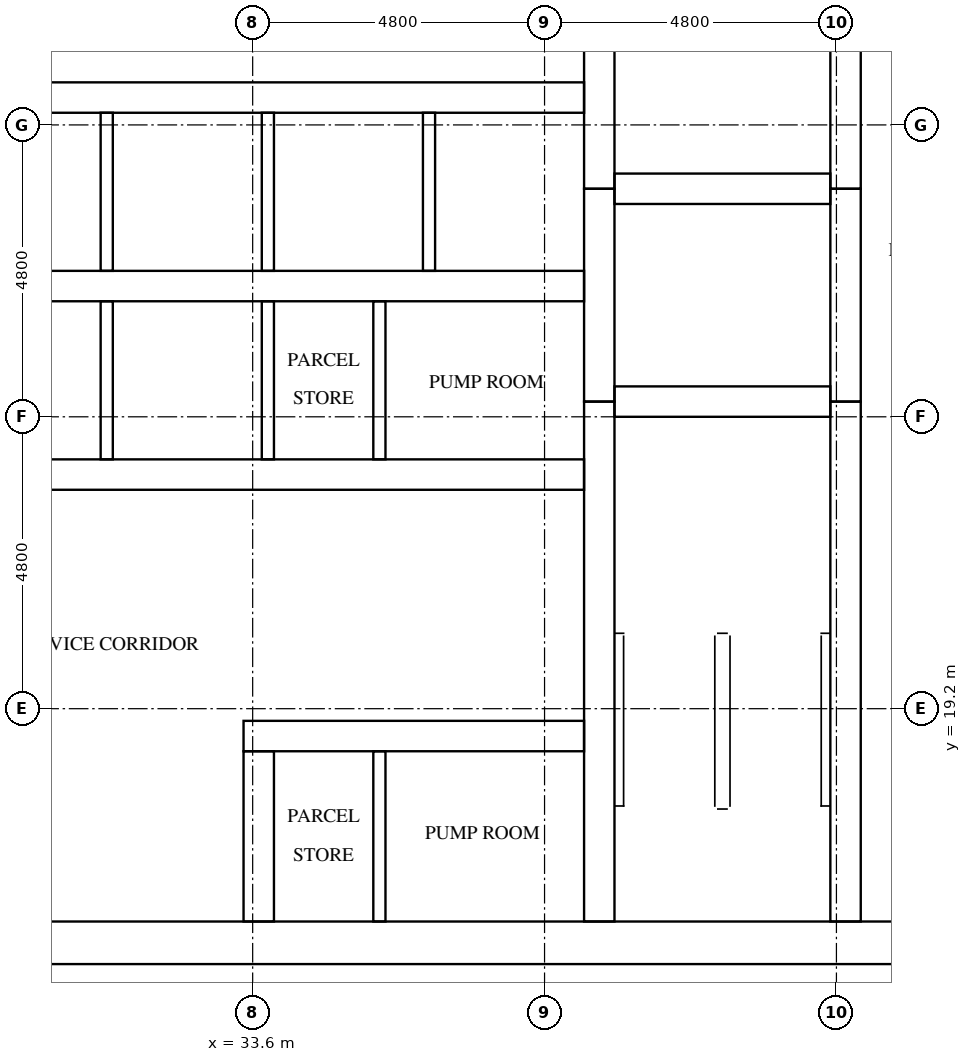
"""IFC4 building model, lengths in metres.
Left out: names, types, materials, properties, quantities, classifications, styles, units other than length and angle.
Written with IfcOpenShell. Run it as: python <this file> out.ifc"""

import sys

from ifc_helpers import new_model, si_unit, direction, frame, frame_2d, origin, place, context, subcontext, project, spatial, rectangle, extrude, element, fill, save


model = new_model("IFC4")
c1 = context("Model", 3, precision=1e-05, world=origin(), true_north=direction((0.0, 1.0)))
c2 = subcontext(c1, "Body", "Model", "MODEL_VIEW")
j1 = project(units=[si_unit("LENGTHUNIT", "METRE"), si_unit("PLANEANGLEUNIT", "RADIAN")], contexts=[c1])
p1 = place(None, origin())
s1 = spatial("IfcSite", under=j1, at=p1, CompositionType="ELEMENT")
p2 = place(p1, origin())
s2 = spatial("IfcBuilding", under=s1, at=p2, CompositionType="ELEMENT")
p3 = place(p2, frame((0.0, 0.0, 222.8)))
s3 = spatial("IfcBuildingStorey", under=s2, at=p3, CompositionType="ELEMENT", Elevation=222.8)
p4 = place(p3, frame((15.0, 15.35, 0.0), z_axis=(0.0, 0.0, 1.0), x_axis=(1.0, 0.0, 0.0)))
e1 = element("IfcWall", 1, at=p4, inside=s3, PredefinedType="SHEAR", context=c2, shape_type="SweptSolid", body=[
    extrude(rectangle(XDim=32.4, YDim=0.7, at=frame_2d((16.2, 0.0))), origin(), (0.0, 0.0, 1.0), 3.2),
])
p5 = place(p4, frame((15.3, 0.0, 0.0)))
e2 = element("IfcOpeningElement", 2, at=p5, cuts=e1, PredefinedType="OPENING", context=c2, shape_type="SweptSolid", body=[
    extrude(rectangle(XDim=1.8, YDim=2.1, at=frame_2d((0.9, 1.05))), frame((0.0, 0.36, 0.0), z_axis=(0.0, -1.0, 0.0), x_axis=(1.0, 0.0, 0.0)), (0.0, 0.0, 1.0), 0.72),
])
p6 = place(p3, frame((39.3, 15.7, 0.0), z_axis=(0.0, 0.0, 1.0), x_axis=(0.0, 1.0, 0.0)))
e3 = element("IfcWall", 3, at=p6, inside=s3, PredefinedType="SHEAR", context=c2, shape_type="SweptSolid", body=[
    extrude(rectangle(XDim=8.55, YDim=0.5, at=frame_2d((4.275, 0.0))), origin(), (0.0, 0.0, 1.0), 3.2),
])
p7 = place(p3, frame((39.3, 24.25, 0.0), z_axis=(0.0, 0.0, 1.0), x_axis=(0.0, 1.0, 0.0)))
e4 = element("IfcWall", 4, at=p7, inside=s3, PredefinedType="SHEAR", context=c2, shape_type="SweptSolid", body=[
    extrude(rectangle(XDim=3.5, YDim=0.5, at=frame_2d((1.75, 0.0))), origin(), (0.0, 0.0, 1.0), 3.2),
])
p8 = place(p3, frame((39.3, 27.75, 0.0), z_axis=(0.0, 0.0, 1.0), x_axis=(0.0, 1.0, 0.0)))
e5 = element("IfcWall", 5, at=p8, inside=s3, PredefinedType="SHEAR", context=c2, shape_type="SweptSolid", body=[
    extrude(rectangle(XDim=9.35, YDim=0.5, at=frame_2d((4.675, 0.0))), origin(), (0.0, 0.0, 1.0), 3.2),
])
p9 = place(p3, frame((43.35, 15.7, 0.0), z_axis=(0.0, 0.0, 1.0), x_axis=(0.0, 1.0, 0.0)))
e6 = element("IfcWall", 6, at=p9, inside=s3, PredefinedType="SHEAR", context=c2, shape_type="SweptSolid", body=[
    extrude(rectangle(XDim=8.55, YDim=0.5, at=frame_2d((4.275, 0.0))), origin(), (0.0, 0.0, 1.0), 3.2),
])
p10 = place(p9, frame((0.5, 0.0, 0.0)))
e7 = element("IfcOpeningElement", 7, at=p10, cuts=e6, PredefinedType="OPENING", context=c2, shape_type="SweptSolid", body=[
    extrude(rectangle(XDim=1.2, YDim=2.1, at=frame_2d((0.6, 1.05))), frame((0.0, 0.26, 0.0), z_axis=(0.0, -1.0, 0.0), x_axis=(1.0, 0.0, 0.0)), (0.0, 0.0, 1.0), 0.52),
])
p11 = place(p3, frame((43.35, 24.25, 0.0), z_axis=(0.0, 0.0, 1.0), x_axis=(0.0, 1.0, 0.0)))
e8 = element("IfcWall", 8, at=p11, inside=s3, PredefinedType="SHEAR", context=c2, shape_type="SweptSolid", body=[
    extrude(rectangle(XDim=3.5, YDim=0.5, at=frame_2d((1.75, 0.0))), origin(), (0.0, 0.0, 1.0), 3.2),
])
p12 = place(p11, frame((1.2, 0.0, 0.0)))
e9 = element("IfcOpeningElement", 9, at=p12, cuts=e8, PredefinedType="OPENING", context=c2, shape_type="SweptSolid", body=[
    extrude(rectangle(XDim=1.1, YDim=2.1, at=frame_2d((0.55, 1.05))), frame((0.0, 0.26, 0.0), z_axis=(0.0, -1.0, 0.0), x_axis=(1.0, 0.0, 0.0)), (0.0, 0.0, 1.0), 0.52),
])
p13 = place(p3, frame((43.35, 27.75, 0.0), z_axis=(0.0, 0.0, 1.0), x_axis=(0.0, 1.0, 0.0)))
e10 = element("IfcWall", 10, at=p13, inside=s3, PredefinedType="SHEAR", context=c2, shape_type="SweptSolid", body=[
    extrude(rectangle(XDim=9.35, YDim=0.5, at=frame_2d((4.675, 0.0))), origin(), (0.0, 0.0, 1.0), 3.2),
])
p14 = place(p13, frame((7.65, 0.0, 0.0)))
e11 = element("IfcOpeningElement", 11, at=p14, cuts=e10, PredefinedType="OPENING", context=c2, shape_type="SweptSolid", body=[
    extrude(rectangle(XDim=1.2, YDim=2.1, at=frame_2d((0.6, 1.05))), frame((0.0, 0.26, 0.0), z_axis=(0.0, -1.0, 0.0), x_axis=(1.0, 0.0, 0.0)), (0.0, 0.0, 1.0), 0.52),
])
for number, where, z_axis, x_axis in (
    (12, (39.55, 24.25, 0.0), (0.0, 0.0, 1.0), (1.0, 0.0, 0.0)),
    (13, (39.55, 27.75, 0.0), (0.0, 0.0, 1.0), (1.0, 0.0, 0.0)),
):
    element("IfcWall", number, at=place(p3, frame(where, z_axis=z_axis, x_axis=x_axis)), inside=s3, PredefinedType="SHEAR", context=c2, shape_type="SweptSolid", body=[
        extrude(rectangle(XDim=3.55, YDim=0.5, at=frame_2d((1.775, 0.0))), origin(), (0.0, 0.0, 1.0), 3.2),
    ])
p15 = place(p3, frame((33.45, 18.75, 0.0), z_axis=(0.0, 0.0, 1.0), x_axis=(1.0, 0.0, 0.0)))
e14 = element("IfcWall", 14, at=p15, inside=s3, PredefinedType="SHEAR", context=c2, shape_type="SweptSolid", body=[
    extrude(rectangle(XDim=5.6, YDim=0.5, at=frame_2d((2.8, 0.0))), origin(), (0.0, 0.0, 1.0), 3.2),
])
p16 = place(p15, frame((0.817, 0.0, 0.0)))
e15 = element("IfcOpeningElement", 15, at=p16, cuts=e14, PredefinedType="OPENING", context=c2, shape_type="SweptSolid", body=[
    extrude(rectangle(XDim=1.0, YDim=2.1, at=frame_2d((0.5, 1.05))), frame((0.0, 0.26, 0.0), z_axis=(0.0, -1.0, 0.0), x_axis=(1.0, 0.0, 0.0)), (0.0, 0.0, 1.0), 0.52),
])
p17 = place(p15, frame((3.467, 0.0, 0.0)))
e16 = element("IfcOpeningElement", 16, at=p17, cuts=e14, PredefinedType="OPENING", context=c2, shape_type="SweptSolid", body=[
    extrude(rectangle(XDim=1.0, YDim=2.1, at=frame_2d((0.5, 1.05))), frame((0.0, 0.26, 0.0), z_axis=(0.0, -1.0, 0.0), x_axis=(1.0, 0.0, 0.0)), (0.0, 0.0, 1.0), 0.52),
])
p18 = place(p3, frame((23.35, 23.05, 0.0), z_axis=(0.0, 0.0, 1.0), x_axis=(1.0, 0.0, 0.0)))
e17 = element("IfcWall", 17, at=p18, inside=s3, PredefinedType="SHEAR", context=c2, shape_type="SweptSolid", body=[
    extrude(rectangle(XDim=15.7, YDim=0.5, at=frame_2d((7.85, 0.0))), origin(), (0.0, 0.0, 1.0), 3.2),
])
p19 = place(p18, frame((0.317, 0.0, 0.0)))
e18 = element("IfcOpeningElement", 18, at=p19, cuts=e17, PredefinedType="OPENING", context=c2, shape_type="SweptSolid", body=[
    extrude(rectangle(XDim=1.0, YDim=2.1, at=frame_2d((0.5, 1.05))), frame((0.0, 0.26, 0.0), z_axis=(0.0, -1.0, 0.0), x_axis=(1.0, 0.0, 0.0)), (0.0, 0.0, 1.0), 0.52),
])
p20 = place(p18, frame((2.967, 0.0, 0.0)))
e19 = element("IfcOpeningElement", 19, at=p20, cuts=e17, PredefinedType="OPENING", context=c2, shape_type="SweptSolid", body=[
    extrude(rectangle(XDim=1.0, YDim=2.1, at=frame_2d((0.5, 1.05))), frame((0.0, 0.26, 0.0), z_axis=(0.0, -1.0, 0.0), x_axis=(1.0, 0.0, 0.0)), (0.0, 0.0, 1.0), 0.52),
])
p21 = place(p18, frame((10.917, 0.0, 0.0)))
e20 = element("IfcOpeningElement", 20, at=p21, cuts=e17, PredefinedType="OPENING", context=c2, shape_type="SweptSolid", body=[
    extrude(rectangle(XDim=1.0, YDim=2.1, at=frame_2d((0.5, 1.05))), frame((0.0, 0.26, 0.0), z_axis=(0.0, -1.0, 0.0), x_axis=(1.0, 0.0, 0.0)), (0.0, 0.0, 1.0), 0.52),
])
p22 = place(p18, frame((13.567, 0.0, 0.0)))
e21 = element("IfcOpeningElement", 21, at=p22, cuts=e17, PredefinedType="OPENING", context=c2, shape_type="SweptSolid", body=[
    extrude(rectangle(XDim=1.0, YDim=2.1, at=frame_2d((0.5, 1.05))), frame((0.0, 0.26, 0.0), z_axis=(0.0, -1.0, 0.0), x_axis=(1.0, 0.0, 0.0)), (0.0, 0.0, 1.0), 0.52),
])
p23 = place(p3, frame((23.35, 26.15, 0.0), z_axis=(0.0, 0.0, 1.0), x_axis=(1.0, 0.0, 0.0)))
e22 = element("IfcWall", 22, at=p23, inside=s3, PredefinedType="SHEAR", context=c2, shape_type="SweptSolid", body=[
    extrude(rectangle(XDim=15.7, YDim=0.5, at=frame_2d((7.85, 0.0))), origin(), (0.0, 0.0, 1.0), 3.2),
])
p24 = place(p3, frame((23.35, 29.25, 0.0), z_axis=(0.0, 0.0, 1.0), x_axis=(1.0, 0.0, 0.0)))
e23 = element("IfcWall", 23, at=p24, inside=s3, PredefinedType="SHEAR", context=c2, shape_type="SweptSolid", body=[
    extrude(rectangle(XDim=15.7, YDim=0.5, at=frame_2d((7.85, 0.0))), origin(), (0.0, 0.0, 1.0), 3.2),
])
p25 = place(p24, frame((0.675, 0.0, 0.0)))
e24 = element("IfcOpeningElement", 24, at=p25, cuts=e23, PredefinedType="OPENING", context=c2, shape_type="SweptSolid", body=[
    extrude(rectangle(XDim=1.1, YDim=2.1, at=frame_2d((0.55, 1.05))), frame((0.0, 0.26, 0.0), z_axis=(0.0, -1.0, 0.0), x_axis=(1.0, 0.0, 0.0)), (0.0, 0.0, 1.0), 0.52),
])
p26 = place(p24, frame((3.325, 0.0, 0.0)))
e25 = element("IfcOpeningElement", 25, at=p26, cuts=e23, PredefinedType="OPENING", context=c2, shape_type="SweptSolid", body=[
    extrude(rectangle(XDim=1.1, YDim=2.1, at=frame_2d((0.55, 1.05))), frame((0.0, 0.26, 0.0), z_axis=(0.0, -1.0, 0.0), x_axis=(1.0, 0.0, 0.0)), (0.0, 0.0, 1.0), 0.52),
])
p27 = place(p24, frame((5.975, 0.0, 0.0)))
e26 = element("IfcOpeningElement", 26, at=p27, cuts=e23, PredefinedType="OPENING", context=c2, shape_type="SweptSolid", body=[
    extrude(rectangle(XDim=1.1, YDim=2.1, at=frame_2d((0.55, 1.05))), frame((0.0, 0.26, 0.0), z_axis=(0.0, -1.0, 0.0), x_axis=(1.0, 0.0, 0.0)), (0.0, 0.0, 1.0), 0.52),
])
p28 = place(p24, frame((8.625, 0.0, 0.0)))
e27 = element("IfcOpeningElement", 27, at=p28, cuts=e23, PredefinedType="OPENING", context=c2, shape_type="SweptSolid", body=[
    extrude(rectangle(XDim=1.1, YDim=2.1, at=frame_2d((0.55, 1.05))), frame((0.0, 0.26, 0.0), z_axis=(0.0, -1.0, 0.0), x_axis=(1.0, 0.0, 0.0)), (0.0, 0.0, 1.0), 0.52),
])
p29 = place(p24, frame((11.275, 0.0, 0.0)))
e28 = element("IfcOpeningElement", 28, at=p29, cuts=e23, PredefinedType="OPENING", context=c2, shape_type="SweptSolid", body=[
    extrude(rectangle(XDim=1.1, YDim=2.1, at=frame_2d((0.55, 1.05))), frame((0.0, 0.26, 0.0), z_axis=(0.0, -1.0, 0.0), x_axis=(1.0, 0.0, 0.0)), (0.0, 0.0, 1.0), 0.52),
])
p30 = place(p24, frame((13.925, 0.0, 0.0)))
e29 = element("IfcOpeningElement", 29, at=p30, cuts=e23, PredefinedType="OPENING", context=c2, shape_type="SweptSolid", body=[
    extrude(rectangle(XDim=1.1, YDim=2.1, at=frame_2d((0.55, 1.05))), frame((0.0, 0.26, 0.0), z_axis=(0.0, -1.0, 0.0), x_axis=(1.0, 0.0, 0.0)), (0.0, 0.0, 1.0), 0.52),
])
p31 = place(p3, frame((33.7, 15.7, 0.0), z_axis=(0.0, 0.0, 1.0), x_axis=(0.0, 1.0, 0.0)))
e30 = element("IfcWall", 30, at=p31, inside=s3, PredefinedType="SHEAR", context=c2, shape_type="SweptSolid", body=[
    extrude(rectangle(XDim=2.8, YDim=0.5, at=frame_2d((1.4, 0.0))), origin(), (0.0, 0.0, 1.0), 3.2),
])
p32 = place(p3, frame((31.2, 23.3, 0.0), z_axis=(0.0, 0.0, 1.0), x_axis=(0.0, 1.0, 0.0)))
e31 = element("IfcWall", 31, at=p32, inside=s3, PredefinedType="SOLIDWALL", context=c2, shape_type="SweptSolid", body=[
    extrude(rectangle(XDim=2.6, YDim=0.2, at=frame_2d((1.3, 0.0))), origin(), (0.0, 0.0, 1.0), 3.2),
])
p33 = place(p3, frame((31.2, 26.4, 0.0), z_axis=(0.0, 0.0, 1.0), x_axis=(0.0, 1.0, 0.0)))
e32 = element("IfcWall", 32, at=p33, inside=s3, PredefinedType="SOLIDWALL", context=c2, shape_type="SweptSolid", body=[
    extrude(rectangle(XDim=2.6, YDim=0.2, at=frame_2d((1.3, 0.0))), origin(), (0.0, 0.0, 1.0), 3.2),
])
p34 = place(p3, frame((33.85, 23.3, 0.0), z_axis=(0.0, 0.0, 1.0), x_axis=(0.0, 1.0, 0.0)))
e33 = element("IfcWall", 33, at=p34, inside=s3, PredefinedType="SOLIDWALL", context=c2, shape_type="SweptSolid", body=[
    extrude(rectangle(XDim=2.6, YDim=0.2, at=frame_2d((1.3, 0.0))), origin(), (0.0, 0.0, 1.0), 3.2),
])
for number, where, z_axis, x_axis in (
    (34, (33.85, 26.4, 0.0), (0.0, 0.0, 1.0), (0.0, 1.0, 0.0)),
    (35, (36.5, 26.4, 0.0), (0.0, 0.0, 1.0), (0.0, 1.0, 0.0)),
):
    element("IfcWall", number, at=place(p3, frame(where, z_axis=z_axis, x_axis=x_axis)), inside=s3, PredefinedType="SOLIDWALL", context=c2, shape_type="SweptSolid", body=[
        extrude(rectangle(XDim=2.6, YDim=0.2, at=frame_2d((1.3, 0.0))), origin(), (0.0, 0.0, 1.0), 3.2),
    ])
p35 = place(p3, frame((35.684, 23.3, 0.0), z_axis=(0.0, 0.0, 1.0), x_axis=(0.0, 1.0, 0.0)))
e36 = element("IfcWall", 36, at=p35, inside=s3, PredefinedType="PARTITIONING", context=c2, shape_type="SweptSolid", body=[
    extrude(rectangle(XDim=2.6, YDim=0.2, at=frame_2d((1.3, 0.0))), origin(), (0.0, 0.0, 1.0), 3.2),
])
p36 = place(p3, frame((35.684, 15.7, 0.0), z_axis=(0.0, 0.0, 1.0), x_axis=(0.0, 1.0, 0.0)))
e37 = element("IfcWall", 37, at=p36, inside=s3, PredefinedType="PARTITIONING", context=c2, shape_type="SweptSolid", body=[
    extrude(rectangle(XDim=2.8, YDim=0.2, at=frame_2d((1.4, 0.0))), origin(), (0.0, 0.0, 1.0), 3.2),
])
p37 = place(p27, origin())
e38 = element("IfcDoor", 38, at=p37, inside=s3, OperationType="DOUBLE_DOOR_SLIDING", PredefinedType="DOOR", context=c2, shape_type="SweptSolid", body=[
    extrude(rectangle(XDim=1.1, YDim=2.1, at=frame_2d((0.55, 1.05))), frame((0.0, 0.025, 0.0), z_axis=(0.0, -1.0, 0.0), x_axis=(1.0, 0.0, 0.0)), (0.0, 0.0, 1.0), 0.05),
])
fill(e26, e38)
p38 = place(p28, origin())
e39 = element("IfcDoor", 39, at=p38, inside=s3, OperationType="DOUBLE_DOOR_SLIDING", PredefinedType="DOOR", context=c2, shape_type="SweptSolid", body=[
    extrude(rectangle(XDim=1.1, YDim=2.1, at=frame_2d((0.55, 1.05))), frame((0.0, 0.025, 0.0), z_axis=(0.0, -1.0, 0.0), x_axis=(1.0, 0.0, 0.0)), (0.0, 0.0, 1.0), 0.05),
])
fill(e27, e39)
p39 = place(p29, origin())
e40 = element("IfcDoor", 40, at=p39, inside=s3, OperationType="DOUBLE_DOOR_SLIDING", PredefinedType="DOOR", context=c2, shape_type="SweptSolid", body=[
    extrude(rectangle(XDim=1.1, YDim=2.1, at=frame_2d((0.55, 1.05))), frame((0.0, 0.025, 0.0), z_axis=(0.0, -1.0, 0.0), x_axis=(1.0, 0.0, 0.0)), (0.0, 0.0, 1.0), 0.05),
])
fill(e28, e40)
p40 = place(p30, origin())
e41 = element("IfcDoor", 41, at=p40, inside=s3, OperationType="DOUBLE_DOOR_SLIDING", PredefinedType="DOOR", context=c2, shape_type="SweptSolid", body=[
    extrude(rectangle(XDim=1.1, YDim=2.1, at=frame_2d((0.55, 1.05))), frame((0.0, 0.025, 0.0), z_axis=(0.0, -1.0, 0.0), x_axis=(1.0, 0.0, 0.0)), (0.0, 0.0, 1.0), 0.05),
])
fill(e29, e41)
p41 = place(p12, origin())
e42 = element("IfcDoor", 42, at=p41, inside=s3, OperationType="DOUBLE_DOOR_SLIDING", PredefinedType="DOOR", context=c2, shape_type="SweptSolid", body=[
    extrude(rectangle(XDim=1.1, YDim=2.1, at=frame_2d((0.55, 1.05))), frame((0.0, 0.025, 0.0), z_axis=(0.0, -1.0, 0.0), x_axis=(1.0, 0.0, 0.0)), (0.0, 0.0, 1.0), 0.05),
])
fill(e9, e42)
p42 = place(p10, origin())
e43 = element("IfcDoor", 43, at=p42, inside=s3, OperationType="SINGLE_SWING_LEFT", PredefinedType="DOOR", context=c2, shape_type="SweptSolid", body=[
    extrude(rectangle(XDim=1.2, YDim=2.1, at=frame_2d((0.6, 1.05))), frame((0.0, 0.025, 0.0), z_axis=(0.0, -1.0, 0.0), x_axis=(1.0, 0.0, 0.0)), (0.0, 0.0, 1.0), 0.05),
])
fill(e7, e43)
p43 = place(p5, frame((1.8, 0.0, 0.0), z_axis=(0.0, 0.0, 1.0), x_axis=(-1.0, 0.0, 0.0)))
e44 = element("IfcDoor", 44, at=p43, inside=s3, OperationType="DOUBLE_DOOR_SINGLE_SWING", PredefinedType="DOOR", context=c2, shape_type="SweptSolid", body=[
    extrude(rectangle(XDim=1.8, YDim=2.1, at=frame_2d((0.9, 1.05))), frame((0.0, 0.025, 0.0), z_axis=(0.0, -1.0, 0.0), x_axis=(1.0, 0.0, 0.0)), (0.0, 0.0, 1.0), 0.05),
])
fill(e2, e44)
p44 = place(p21, frame((1.0, 0.0, 0.0), z_axis=(0.0, 0.0, 1.0), x_axis=(-1.0, 0.0, 0.0)))
e45 = element("IfcDoor", 45, at=p44, inside=s3, OperationType="SINGLE_SWING_LEFT", PredefinedType="DOOR", context=c2, shape_type="SweptSolid", body=[
    extrude(rectangle(XDim=1.0, YDim=2.1, at=frame_2d((0.5, 1.05))), frame((0.0, 0.025, 0.0), z_axis=(0.0, -1.0, 0.0), x_axis=(1.0, 0.0, 0.0)), (0.0, 0.0, 1.0), 0.05),
])
fill(e20, e45)
p45 = place(p22, frame((1.0, 0.0, 0.0), z_axis=(0.0, 0.0, 1.0), x_axis=(-1.0, 0.0, 0.0)))
e46 = element("IfcDoor", 46, at=p45, inside=s3, OperationType="SINGLE_SWING_RIGHT", PredefinedType="DOOR", context=c2, shape_type="SweptSolid", body=[
    extrude(rectangle(XDim=1.0, YDim=2.1, at=frame_2d((0.5, 1.05))), frame((0.0, 0.025, 0.0), z_axis=(0.0, -1.0, 0.0), x_axis=(1.0, 0.0, 0.0)), (0.0, 0.0, 1.0), 0.05),
])
fill(e21, e46)
p46 = place(p16, origin())
e47 = element("IfcDoor", 47, at=p46, inside=s3, OperationType="SINGLE_SWING_LEFT", PredefinedType="DOOR", context=c2, shape_type="SweptSolid", body=[
    extrude(rectangle(XDim=1.0, YDim=2.1, at=frame_2d((0.5, 1.05))), frame((0.0, 0.025, 0.0), z_axis=(0.0, -1.0, 0.0), x_axis=(1.0, 0.0, 0.0)), (0.0, 0.0, 1.0), 0.05),
])
fill(e15, e47)
p47 = place(p17, origin())
e48 = element("IfcDoor", 48, at=p47, inside=s3, OperationType="SINGLE_SWING_RIGHT", PredefinedType="DOOR", context=c2, shape_type="SweptSolid", body=[
    extrude(rectangle(XDim=1.0, YDim=2.1, at=frame_2d((0.5, 1.05))), frame((0.0, 0.025, 0.0), z_axis=(0.0, -1.0, 0.0), x_axis=(1.0, 0.0, 0.0)), (0.0, 0.0, 1.0), 0.05),
])
fill(e16, e48)
save(model, sys.argv[1])
